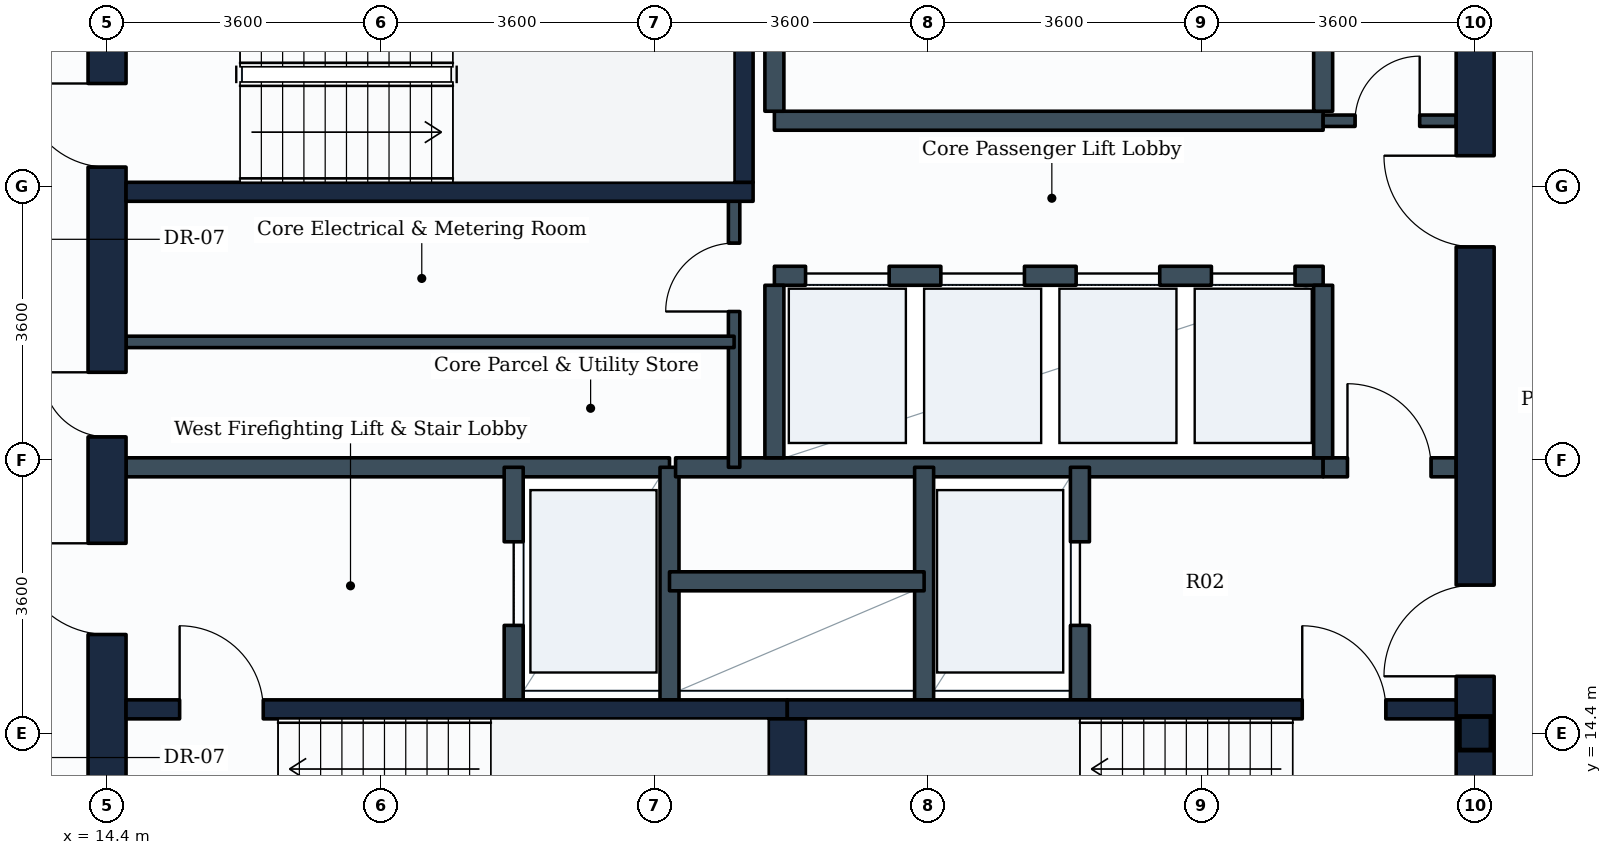
"""IFC4 building model, lengths in metres.
Left out: names, types, materials, properties, quantities, classifications, styles, units other than length and angle.
Written with IfcOpenShell. Run it as: python <this file> out.ifc"""

import sys

from ifc_helpers import new_model, si_unit, direction, frame, frame_2d, origin, origin_2d, place, context, subcontext, project, spatial, rectangle, i_section, extrude, element, fill, save


model = new_model("IFC4")
c1 = context("Model", 3, precision=1e-05, world=origin(), true_north=direction((0.0, 1.0)))
c2 = subcontext(c1, "Body", "Model", "MODEL_VIEW")
j1 = project(units=[si_unit("LENGTHUNIT", "METRE"), si_unit("PLANEANGLEUNIT", "RADIAN")], contexts=[c1])
p1 = place(None, origin())
s1 = spatial("IfcSite", under=j1, at=p1, CompositionType="ELEMENT")
p2 = place(p1, origin())
s2 = spatial("IfcBuilding", under=s1, at=p2, CompositionType="ELEMENT")
p3 = place(p2, frame((0.0, 0.0, 182.4)))
s3 = spatial("IfcBuildingStorey", under=s2, at=p3, CompositionType="ELEMENT", Elevation=182.4)
p4 = place(p3, frame((32.4, 14.4, 0.0), z_axis=(0.0, 0.0, 1.0), x_axis=(1.0, 0.0, 0.0)))
e1 = element("IfcColumn", 1, at=p4, inside=s3, PredefinedType="COLUMN", context=c2, shape_type="SweptSolid", body=[
    extrude(i_section(OverallWidth=0.416, OverallDepth=0.442, WebThickness=0.025, FlangeThickness=0.041, FilletRadius=0.015, at=origin_2d()), origin(), (0.0, 0.0, 1.0), 3.8),
])
p5 = place(p3, frame((14.4, 10.8, 0.0), z_axis=(0.0, 0.0, 1.0), x_axis=(0.0, 1.0, 0.0)))
e2 = element("IfcWall", 2, at=p5, inside=s3, PredefinedType="SHEAR", context=c2, shape_type="SweptSolid", body=[
    extrude(rectangle(XDim=14.4, YDim=0.5, at=frame_2d((7.2, 0.0))), origin(), (0.0, 0.0, 1.0), 3.55),
])
p6 = place(p5, frame((11.05, 0.0, 0.0)))
e3 = element("IfcOpeningElement", 3, at=p6, cuts=e2, PredefinedType="OPENING", context=c2, shape_type="SweptSolid", body=[
    extrude(rectangle(XDim=1.1, YDim=2.1, at=frame_2d((0.55, 1.05))), frame((0.0, 0.26, 0.0), z_axis=(0.0, -1.0, 0.0), x_axis=(1.0, 0.0, 0.0)), (0.0, 0.0, 1.0), 0.52),
])
p7 = place(p5, frame((4.9, 0.0, 0.0)))
e4 = element("IfcOpeningElement", 4, at=p7, cuts=e2, PredefinedType="OPENING", context=c2, shape_type="SweptSolid", body=[
    extrude(rectangle(XDim=1.2, YDim=2.1, at=frame_2d((0.6, 1.05))), frame((0.0, 0.26, 0.0), z_axis=(0.0, -1.0, 0.0), x_axis=(1.0, 0.0, 0.0)), (0.0, 0.0, 1.0), 0.52),
])
p8 = place(p5, frame((7.5, 0.0, 0.0)))
e5 = element("IfcOpeningElement", 5, at=p8, cuts=e2, PredefinedType="OPENING", context=c2, shape_type="SweptSolid", body=[
    extrude(rectangle(XDim=0.85, YDim=2.1, at=frame_2d((0.425, 1.05))), frame((0.0, 0.26, 0.0), z_axis=(0.0, -1.0, 0.0), x_axis=(1.0, 0.0, 0.0)), (0.0, 0.0, 1.0), 0.52),
])
p9 = place(p3, frame((32.4, 10.8, 0.0), z_axis=(0.0, 0.0, 1.0), x_axis=(0.0, 1.0, 0.0)))
e6 = element("IfcWall", 6, at=p9, inside=s3, PredefinedType="SHEAR", context=c2, shape_type="SweptSolid", body=[
    extrude(rectangle(XDim=14.4, YDim=0.5, at=frame_2d((7.2, 0.0))), origin(), (0.0, 0.0, 1.0), 3.55),
])
p10 = place(p9, frame((4.35, 0.0, 0.0)))
e7 = element("IfcOpeningElement", 7, at=p10, cuts=e6, PredefinedType="OPENING", context=c2, shape_type="SweptSolid", body=[
    extrude(rectangle(XDim=1.2, YDim=2.1, at=frame_2d((0.6, 1.05))), frame((0.0, 0.26, 0.0), z_axis=(0.0, -1.0, 0.0), x_axis=(1.0, 0.0, 0.0)), (0.0, 0.0, 1.0), 0.52),
])
p11 = place(p9, frame((10.0, 0.0, 0.0)))
e8 = element("IfcOpeningElement", 8, at=p11, cuts=e6, PredefinedType="OPENING", context=c2, shape_type="SweptSolid", body=[
    extrude(rectangle(XDim=1.2, YDim=2.1, at=frame_2d((0.6, 1.05))), frame((0.0, 0.26, 0.0), z_axis=(0.0, -1.0, 0.0), x_axis=(1.0, 0.0, 0.0)), (0.0, 0.0, 1.0), 0.52),
])
p12 = place(p3, frame((14.65, 14.715, 0.0), z_axis=(0.0, 0.0, 1.0), x_axis=(1.0, 0.0, 0.0)))
e9 = element("IfcWall", 9, at=p12, inside=s3, PredefinedType="SHEAR", context=c2, shape_type="SweptSolid", body=[
    extrude(rectangle(XDim=8.7, YDim=0.25, at=frame_2d((4.35, 0.0))), origin(), (0.0, 0.0, 1.0), 3.55),
])
p13 = place(p12, frame((0.705, 0.0, 0.0)))
e10 = element("IfcOpeningElement", 10, at=p13, cuts=e9, PredefinedType="OPENING", context=c2, shape_type="SweptSolid", body=[
    extrude(rectangle(XDim=1.1, YDim=2.1, at=frame_2d((0.55, 1.05))), frame((0.0, 0.135, 0.0), z_axis=(0.0, -1.0, 0.0), x_axis=(1.0, 0.0, 0.0)), (0.0, 0.0, 1.0), 0.27),
])
p14 = place(p3, frame((23.35, 14.715, 0.0), z_axis=(0.0, 0.0, 1.0), x_axis=(1.0, 0.0, 0.0)))
e11 = element("IfcWall", 11, at=p14, inside=s3, PredefinedType="SHEAR", context=c2, shape_type="SweptSolid", body=[
    extrude(rectangle(XDim=8.8, YDim=0.25, at=frame_2d((4.4, 0.0))), origin(), (0.0, 0.0, 1.0), 3.55),
])
p15 = place(p14, frame((6.775, 0.0, 0.0)))
e12 = element("IfcOpeningElement", 12, at=p15, cuts=e11, PredefinedType="OPENING", context=c2, shape_type="SweptSolid", body=[
    extrude(rectangle(XDim=1.1, YDim=2.1, at=frame_2d((0.55, 1.05))), frame((0.0, 0.135, 0.0), z_axis=(0.0, -1.0, 0.0), x_axis=(1.0, 0.0, 0.0)), (0.0, 0.0, 1.0), 0.27),
])
p16 = place(p3, frame((23.35, 11.75, 0.0), z_axis=(0.0, 0.0, 1.0), x_axis=(0.0, 1.0, 0.0)))
e13 = element("IfcWall", 13, at=p16, inside=s3, PredefinedType="SHEAR", context=c2, shape_type="SweptSolid", body=[
    extrude(rectangle(XDim=2.84, YDim=0.5, at=frame_2d((1.42, 0.0))), origin(), (0.0, 0.0, 1.0), 3.55),
])
p17 = place(p3, frame((14.65, 21.525, 0.0), z_axis=(0.0, 0.0, 1.0), x_axis=(1.0, 0.0, 0.0)))
e14 = element("IfcWall", 14, at=p17, inside=s3, PredefinedType="SHEAR", context=c2, shape_type="SweptSolid", body=[
    extrude(rectangle(XDim=8.25, YDim=0.25, at=frame_2d((4.125, 0.0))), origin(), (0.0, 0.0, 1.0), 3.55),
])
p18 = place(p3, frame((22.775, 21.65, 0.0), z_axis=(0.0, 0.0, 1.0), x_axis=(0.0, 1.0, 0.0)))
e15 = element("IfcWall", 15, at=p18, inside=s3, PredefinedType="SHEAR", context=c2, shape_type="SweptSolid", body=[
    extrude(rectangle(XDim=2.84, YDim=0.25, at=frame_2d((1.42, 0.0))), origin(), (0.0, 0.0, 1.0), 3.55),
])
p19 = place(p3, frame((14.65, 17.9, 0.0), z_axis=(0.0, 0.0, 1.0), x_axis=(1.0, 0.0, 0.0)))
e16 = element("IfcWall", 16, at=p19, inside=s3, PredefinedType="PARTITIONING", context=c2, shape_type="SweptSolid", body=[
    extrude(rectangle(XDim=7.15, YDim=0.25, at=frame_2d((3.575, 0.0))), origin(), (0.0, 0.0, 1.0), 3.535),
])
p20 = place(p3, frame((19.75, 14.84, 0.0), z_axis=(0.0, 0.0, 1.0), x_axis=(0.0, 1.0, 0.0)))
e17 = element("IfcWall", 17, at=p20, inside=s3, PredefinedType="PARTITIONING", context=c2, shape_type="SweptSolid", body=[
    extrude(rectangle(XDim=3.06, YDim=0.25, at=frame_2d((1.53, 0.0))), origin(), (0.0, 0.0, 1.0), 3.535),
])
p21 = place(p20, frame((0.98, 0.0, 0.0)))
e18 = element("IfcOpeningElement", 18, at=p21, cuts=e17, PredefinedType="OPENING", context=c2, shape_type="SweptSolid", body=[
    extrude(rectangle(XDim=1.1, YDim=2.1, at=frame_2d((0.55, 1.05))), frame((0.0, 0.135, 0.0), z_axis=(0.0, -1.0, 0.0), x_axis=(1.0, 0.0, 0.0)), (0.0, 0.0, 1.0), 0.27),
])
p22 = place(p3, frame((21.8, 14.84, 0.0), z_axis=(0.0, 0.0, 1.0), x_axis=(0.0, 1.0, 0.0)))
e19 = element("IfcWall", 19, at=p22, inside=s3, PredefinedType="PARTITIONING", context=c2, shape_type="SweptSolid", body=[
    extrude(rectangle(XDim=3.06, YDim=0.25, at=frame_2d((1.53, 0.0))), origin(), (0.0, 0.0, 1.0), 3.535),
])
p23 = place(p3, frame((21.88, 17.9, 0.0), z_axis=(0.0, 0.0, 1.0), x_axis=(1.0, 0.0, 0.0)))
e20 = element("IfcWall", 20, at=p23, inside=s3, PredefinedType="PARTITIONING", context=c2, shape_type="SweptSolid", body=[
    extrude(rectangle(XDim=8.52, YDim=0.25, at=frame_2d((4.26, 0.0))), origin(), (0.0, 0.0, 1.0), 3.535),
])
p24 = place(p3, frame((30.4, 17.9, 0.0), z_axis=(0.0, 0.0, 1.0), x_axis=(1.0, 0.0, 0.0)))
e21 = element("IfcWall", 21, at=p24, inside=s3, PredefinedType="PARTITIONING", context=c2, shape_type="SweptSolid", body=[
    extrude(rectangle(XDim=1.75, YDim=0.25, at=frame_2d((0.875, 0.0))), origin(), (0.0, 0.0, 1.0), 3.535),
])
p25 = place(p24, frame((0.32, 0.0, 0.0)))
e22 = element("IfcOpeningElement", 22, at=p25, cuts=e21, PredefinedType="OPENING", context=c2, shape_type="SweptSolid", body=[
    extrude(rectangle(XDim=1.1, YDim=2.1, at=frame_2d((0.55, 1.05))), frame((0.0, 0.135, 0.0), z_axis=(0.0, -1.0, 0.0), x_axis=(1.0, 0.0, 0.0)), (0.0, 0.0, 1.0), 0.27),
])
p26 = place(p3, frame((25.15, 14.84, 0.0), z_axis=(0.0, 0.0, 1.0), x_axis=(0.0, 1.0, 0.0)))
e23 = element("IfcWall", 23, at=p26, inside=s3, PredefinedType="PARTITIONING", context=c2, shape_type="SweptSolid", body=[
    extrude(rectangle(XDim=3.06, YDim=0.25, at=frame_2d((1.53, 0.0))), origin(), (0.0, 0.0, 1.0), 3.535),
])
p27 = place(p3, frame((27.2, 14.84, 0.0), z_axis=(0.0, 0.0, 1.0), x_axis=(0.0, 1.0, 0.0)))
e24 = element("IfcWall", 24, at=p27, inside=s3, PredefinedType="PARTITIONING", context=c2, shape_type="SweptSolid", body=[
    extrude(rectangle(XDim=3.06, YDim=0.25, at=frame_2d((1.53, 0.0))), origin(), (0.0, 0.0, 1.0), 3.535),
])
p28 = place(p27, frame((0.98, 0.0, 0.0)))
e25 = element("IfcOpeningElement", 25, at=p28, cuts=e24, PredefinedType="OPENING", context=c2, shape_type="SweptSolid", body=[
    extrude(rectangle(XDim=1.1, YDim=2.1, at=frame_2d((0.55, 1.05))), frame((0.0, 0.135, 0.0), z_axis=(0.0, -1.0, 0.0), x_axis=(1.0, 0.0, 0.0)), (0.0, 0.0, 1.0), 0.27),
])
p29 = place(p3, frame((21.8, 16.4, 0.0), z_axis=(0.0, 0.0, 1.0), x_axis=(1.0, 0.0, 0.0)))
e26 = element("IfcWall", 26, at=p29, inside=s3, PredefinedType="PARTITIONING", context=c2, shape_type="SweptSolid", body=[
    extrude(rectangle(XDim=3.35, YDim=0.25, at=frame_2d((1.675, 0.0))), origin(), (0.0, 0.0, 1.0), 3.535),
])
p30 = place(p3, frame((23.18, 20.42, 0.0), z_axis=(0.0, 0.0, 1.0), x_axis=(1.0, 0.0, 0.0)))
e27 = element("IfcWall", 27, at=p30, inside=s3, PredefinedType="PARTITIONING", context=c2, shape_type="SweptSolid", body=[
    extrude(rectangle(XDim=7.22, YDim=0.25, at=frame_2d((3.61, 0.0))), origin(), (0.0, 0.0, 1.0), 3.535),
])
p31 = place(p30, frame((0.41, 0.0, 0.0)))
e28 = element("IfcOpeningElement", 28, at=p31, cuts=e27, PredefinedType="OPENING", context=c2, shape_type="SweptSolid", body=[
    extrude(rectangle(XDim=1.1, YDim=2.1, at=frame_2d((0.55, 1.05))), frame((0.0, 0.135, 0.0), z_axis=(0.0, -1.0, 0.0), x_axis=(1.0, 0.0, 0.0)), (0.0, 0.0, 1.0), 0.27),
])
p32 = place(p30, frame((2.19, 0.0, 0.0)))
e29 = element("IfcOpeningElement", 29, at=p32, cuts=e27, PredefinedType="OPENING", context=c2, shape_type="SweptSolid", body=[
    extrude(rectangle(XDim=1.1, YDim=2.1, at=frame_2d((0.55, 1.05))), frame((0.0, 0.135, 0.0), z_axis=(0.0, -1.0, 0.0), x_axis=(1.0, 0.0, 0.0)), (0.0, 0.0, 1.0), 0.27),
])
p33 = place(p30, frame((3.97, 0.0, 0.0)))
e30 = element("IfcOpeningElement", 30, at=p33, cuts=e27, PredefinedType="OPENING", context=c2, shape_type="SweptSolid", body=[
    extrude(rectangle(XDim=1.1, YDim=2.1, at=frame_2d((0.55, 1.05))), frame((0.0, 0.135, 0.0), z_axis=(0.0, -1.0, 0.0), x_axis=(1.0, 0.0, 0.0)), (0.0, 0.0, 1.0), 0.27),
])
p34 = place(p30, frame((5.75, 0.0, 0.0)))
e31 = element("IfcOpeningElement", 31, at=p34, cuts=e27, PredefinedType="OPENING", context=c2, shape_type="SweptSolid", body=[
    extrude(rectangle(XDim=1.1, YDim=2.1, at=frame_2d((0.55, 1.05))), frame((0.0, 0.135, 0.0), z_axis=(0.0, -1.0, 0.0), x_axis=(1.0, 0.0, 0.0)), (0.0, 0.0, 1.0), 0.27),
])
for number, where, z_axis, x_axis in (
    (32, (23.18, 18.025, 0.0), (0.0, 0.0, 1.0), (0.0, 1.0, 0.0)),
    (33, (30.4, 18.025, 0.0), (0.0, 0.0, 1.0), (0.0, 1.0, 0.0)),
):
    element("IfcWall", number, at=place(p3, frame(where, z_axis=z_axis, x_axis=x_axis)), inside=s3, PredefinedType="PARTITIONING", context=c2, shape_type="SweptSolid", body=[
        extrude(rectangle(XDim=2.27, YDim=0.25, at=frame_2d((1.135, 0.0))), origin(), (0.0, 0.0, 1.0), 3.535),
    ])
p35 = place(p3, frame((23.18, 22.46, 0.0), z_axis=(0.0, 0.0, 1.0), x_axis=(1.0, 0.0, 0.0)))
e34 = element("IfcWall", 34, at=p35, inside=s3, PredefinedType="PARTITIONING", context=c2, shape_type="SweptSolid", body=[
    extrude(rectangle(XDim=7.22, YDim=0.25, at=frame_2d((3.61, 0.0))), origin(), (0.0, 0.0, 1.0), 3.535),
])
for number, where, z_axis, x_axis in (
    (35, (23.18, 22.585, 0.0), (0.0, 0.0, 1.0), (0.0, 1.0, 0.0)),
    (36, (30.4, 22.585, 0.0), (0.0, 0.0, 1.0), (0.0, 1.0, 0.0)),
):
    element("IfcWall", number, at=place(p3, frame(where, z_axis=z_axis, x_axis=x_axis)), inside=s3, PredefinedType="PARTITIONING", context=c2, shape_type="SweptSolid", body=[
        extrude(rectangle(XDim=2.315, YDim=0.25, at=frame_2d((1.157, 0.0))), origin(), (0.0, 0.0, 1.0), 3.535),
    ])
p36 = place(p3, frame((22.65, 17.9, 0.0), z_axis=(0.0, 0.0, 1.0), x_axis=(0.0, 1.0, 0.0)))
e37 = element("IfcWall", 37, at=p36, inside=s3, PredefinedType="PARTITIONING", context=c2, shape_type="SweptSolid", body=[
    extrude(rectangle(XDim=3.625, YDim=0.15, at=frame_2d((1.812, 0.0))), origin(), (0.0, 0.0, 1.0), 3.535),
])
p37 = place(p36, frame((2.05, 0.0, 0.0)))
e38 = element("IfcOpeningElement", 38, at=p37, cuts=e37, PredefinedType="OPENING", context=c2, shape_type="SweptSolid", body=[
    extrude(rectangle(XDim=0.9, YDim=2.1, at=frame_2d((0.45, 1.05))), frame((0.0, 0.085, 0.0), z_axis=(0.0, -1.0, 0.0), x_axis=(1.0, 0.0, 0.0)), (0.0, 0.0, 1.0), 0.17),
])
p38 = place(p3, frame((14.65, 19.55, 0.0), z_axis=(0.0, 0.0, 1.0), x_axis=(1.0, 0.0, 0.0)))
e39 = element("IfcWall", 39, at=p38, inside=s3, PredefinedType="PARTITIONING", context=c2, shape_type="SweptSolid", body=[
    extrude(rectangle(XDim=8.0, YDim=0.15, at=frame_2d((4.0, 0.0))), origin(), (0.0, 0.0, 1.0), 3.535),
])
p39 = place(p3, frame((30.4, 22.46, 0.0), z_axis=(0.0, 0.0, 1.0), x_axis=(1.0, 0.0, 0.0)))
e40 = element("IfcWall", 40, at=p39, inside=s3, PredefinedType="PARTITIONING", context=c2, shape_type="SweptSolid", body=[
    extrude(rectangle(XDim=1.75, YDim=0.15, at=frame_2d((0.875, 0.0))), origin(), (0.0, 0.0, 1.0), 3.535),
])
p40 = place(p39, frame((0.42, 0.0, 0.0)))
e41 = element("IfcOpeningElement", 41, at=p40, cuts=e40, PredefinedType="OPENING", context=c2, shape_type="SweptSolid", body=[
    extrude(rectangle(XDim=0.85, YDim=2.1, at=frame_2d((0.425, 1.05))), frame((0.0, 0.085, 0.0), z_axis=(0.0, -1.0, 0.0), x_axis=(1.0, 0.0, 0.0)), (0.0, 0.0, 1.0), 0.17),
])
p41 = place(p13, origin())
e42 = element("IfcDoor", 42, at=p41, inside=s3, OperationType="SINGLE_SWING_LEFT", PredefinedType="DOOR", context=c2, shape_type="SweptSolid", body=[
    extrude(rectangle(XDim=1.1, YDim=2.1, at=frame_2d((0.55, 1.05))), frame((0.0, 0.025, 0.0), z_axis=(0.0, -1.0, 0.0), x_axis=(1.0, 0.0, 0.0)), (0.0, 0.0, 1.0), 0.05),
])
fill(e10, e42)
p42 = place(p15, origin())
e43 = element("IfcDoor", 43, at=p42, inside=s3, OperationType="SINGLE_SWING_LEFT", PredefinedType="DOOR", context=c2, shape_type="SweptSolid", body=[
    extrude(rectangle(XDim=1.1, YDim=2.1, at=frame_2d((0.55, 1.05))), frame((0.0, 0.025, 0.0), z_axis=(0.0, -1.0, 0.0), x_axis=(1.0, 0.0, 0.0)), (0.0, 0.0, 1.0), 0.05),
])
fill(e12, e43)
p43 = place(p6, origin())
e44 = element("IfcDoor", 44, at=p43, inside=s3, OperationType="SINGLE_SWING_RIGHT", PredefinedType="DOOR", context=c2, shape_type="SweptSolid", body=[
    extrude(rectangle(XDim=1.1, YDim=2.1, at=frame_2d((0.55, 1.05))), frame((0.0, 0.025, 0.0), z_axis=(0.0, -1.0, 0.0), x_axis=(1.0, 0.0, 0.0)), (0.0, 0.0, 1.0), 0.05),
])
fill(e3, e44)
p44 = place(p21, origin())
e45 = element("IfcDoor", 45, at=p44, inside=s3, OperationType="SLIDING_TO_LEFT", PredefinedType="DOOR", context=c2, shape_type="SweptSolid", body=[
    extrude(rectangle(XDim=1.1, YDim=2.1, at=frame_2d((0.55, 1.05))), frame((0.0, 0.025, 0.0), z_axis=(0.0, -1.0, 0.0), x_axis=(1.0, 0.0, 0.0)), (0.0, 0.0, 1.0), 0.05),
])
fill(e18, e45)
p45 = place(p28, origin())
e46 = element("IfcDoor", 46, at=p45, inside=s3, OperationType="SLIDING_TO_LEFT", PredefinedType="DOOR", context=c2, shape_type="SweptSolid", body=[
    extrude(rectangle(XDim=1.1, YDim=2.1, at=frame_2d((0.55, 1.05))), frame((0.0, 0.025, 0.0), z_axis=(0.0, -1.0, 0.0), x_axis=(1.0, 0.0, 0.0)), (0.0, 0.0, 1.0), 0.05),
])
fill(e25, e46)
p46 = place(p7, origin())
e47 = element("IfcDoor", 47, at=p46, inside=s3, OperationType="SINGLE_SWING_RIGHT", PredefinedType="DOOR", context=c2, shape_type="SweptSolid", body=[
    extrude(rectangle(XDim=1.2, YDim=2.1, at=frame_2d((0.6, 1.05))), frame((0.0, 0.025, 0.0), z_axis=(0.0, -1.0, 0.0), x_axis=(1.0, 0.0, 0.0)), (0.0, 0.0, 1.0), 0.05),
])
fill(e4, e47)
p47 = place(p10, origin())
e48 = element("IfcDoor", 48, at=p47, inside=s3, OperationType="SINGLE_SWING_LEFT", PredefinedType="DOOR", context=c2, shape_type="SweptSolid", body=[
    extrude(rectangle(XDim=1.2, YDim=2.1, at=frame_2d((0.6, 1.05))), frame((0.0, 0.025, 0.0), z_axis=(0.0, -1.0, 0.0), x_axis=(1.0, 0.0, 0.0)), (0.0, 0.0, 1.0), 0.05),
])
fill(e7, e48)
p48 = place(p25, origin())
e49 = element("IfcDoor", 49, at=p48, inside=s3, OperationType="SINGLE_SWING_LEFT", PredefinedType="DOOR", context=c2, shape_type="SweptSolid", body=[
    extrude(rectangle(XDim=1.1, YDim=2.1, at=frame_2d((0.55, 1.05))), frame((0.0, 0.025, 0.0), z_axis=(0.0, -1.0, 0.0), x_axis=(1.0, 0.0, 0.0)), (0.0, 0.0, 1.0), 0.05),
])
fill(e22, e49)
p49 = place(p31, origin())
e50 = element("IfcDoor", 50, at=p49, inside=s3, OperationType="SLIDING_TO_LEFT", PredefinedType="DOOR", context=c2, shape_type="SweptSolid", body=[
    extrude(rectangle(XDim=1.1, YDim=2.1, at=frame_2d((0.55, 1.05))), frame((0.0, 0.025, 0.0), z_axis=(0.0, -1.0, 0.0), x_axis=(1.0, 0.0, 0.0)), (0.0, 0.0, 1.0), 0.05),
])
fill(e28, e50)
p50 = place(p32, origin())
e51 = element("IfcDoor", 51, at=p50, inside=s3, OperationType="SLIDING_TO_LEFT", PredefinedType="DOOR", context=c2, shape_type="SweptSolid", body=[
    extrude(rectangle(XDim=1.1, YDim=2.1, at=frame_2d((0.55, 1.05))), frame((0.0, 0.025, 0.0), z_axis=(0.0, -1.0, 0.0), x_axis=(1.0, 0.0, 0.0)), (0.0, 0.0, 1.0), 0.05),
])
fill(e29, e51)
p51 = place(p33, origin())
e52 = element("IfcDoor", 52, at=p51, inside=s3, OperationType="SLIDING_TO_LEFT", PredefinedType="DOOR", context=c2, shape_type="SweptSolid", body=[
    extrude(rectangle(XDim=1.1, YDim=2.1, at=frame_2d((0.55, 1.05))), frame((0.0, 0.025, 0.0), z_axis=(0.0, -1.0, 0.0), x_axis=(1.0, 0.0, 0.0)), (0.0, 0.0, 1.0), 0.05),
])
fill(e30, e52)
p52 = place(p34, origin())
e53 = element("IfcDoor", 53, at=p52, inside=s3, OperationType="SLIDING_TO_LEFT", PredefinedType="DOOR", context=c2, shape_type="SweptSolid", body=[
    extrude(rectangle(XDim=1.1, YDim=2.1, at=frame_2d((0.55, 1.05))), frame((0.0, 0.025, 0.0), z_axis=(0.0, -1.0, 0.0), x_axis=(1.0, 0.0, 0.0)), (0.0, 0.0, 1.0), 0.05),
])
fill(e31, e53)
p53 = place(p11, origin())
e54 = element("IfcDoor", 54, at=p53, inside=s3, OperationType="SINGLE_SWING_RIGHT", PredefinedType="DOOR", context=c2, shape_type="SweptSolid", body=[
    extrude(rectangle(XDim=1.2, YDim=2.1, at=frame_2d((0.6, 1.05))), frame((0.0, 0.025, 0.0), z_axis=(0.0, -1.0, 0.0), x_axis=(1.0, 0.0, 0.0)), (0.0, 0.0, 1.0), 0.05),
])
fill(e8, e54)
p54 = place(p8, origin())
e55 = element("IfcDoor", 55, at=p54, inside=s3, OperationType="SINGLE_SWING_RIGHT", PredefinedType="DOOR", context=c2, shape_type="SweptSolid", body=[
    extrude(rectangle(XDim=0.85, YDim=2.1, at=frame_2d((0.425, 1.05))), frame((0.0, 0.025, 0.0), z_axis=(0.0, -1.0, 0.0), x_axis=(1.0, 0.0, 0.0)), (0.0, 0.0, 1.0), 0.05),
])
fill(e5, e55)
p55 = place(p37, origin())
e56 = element("IfcDoor", 56, at=p55, inside=s3, OperationType="SINGLE_SWING_LEFT", PredefinedType="DOOR", context=c2, shape_type="SweptSolid", body=[
    extrude(rectangle(XDim=0.9, YDim=2.1, at=frame_2d((0.45, 1.05))), frame((0.0, 0.025, 0.0), z_axis=(0.0, -1.0, 0.0), x_axis=(1.0, 0.0, 0.0)), (0.0, 0.0, 1.0), 0.05),
])
fill(e38, e56)
p56 = place(p40, origin())
e57 = element("IfcDoor", 57, at=p56, inside=s3, OperationType="SINGLE_SWING_RIGHT", PredefinedType="DOOR", context=c2, shape_type="SweptSolid", body=[
    extrude(rectangle(XDim=0.85, YDim=2.1, at=frame_2d((0.425, 1.05))), frame((0.0, 0.025, 0.0), z_axis=(0.0, -1.0, 0.0), x_axis=(1.0, 0.0, 0.0)), (0.0, 0.0, 1.0), 0.05),
])
fill(e41, e57)
save(model, sys.argv[1])
